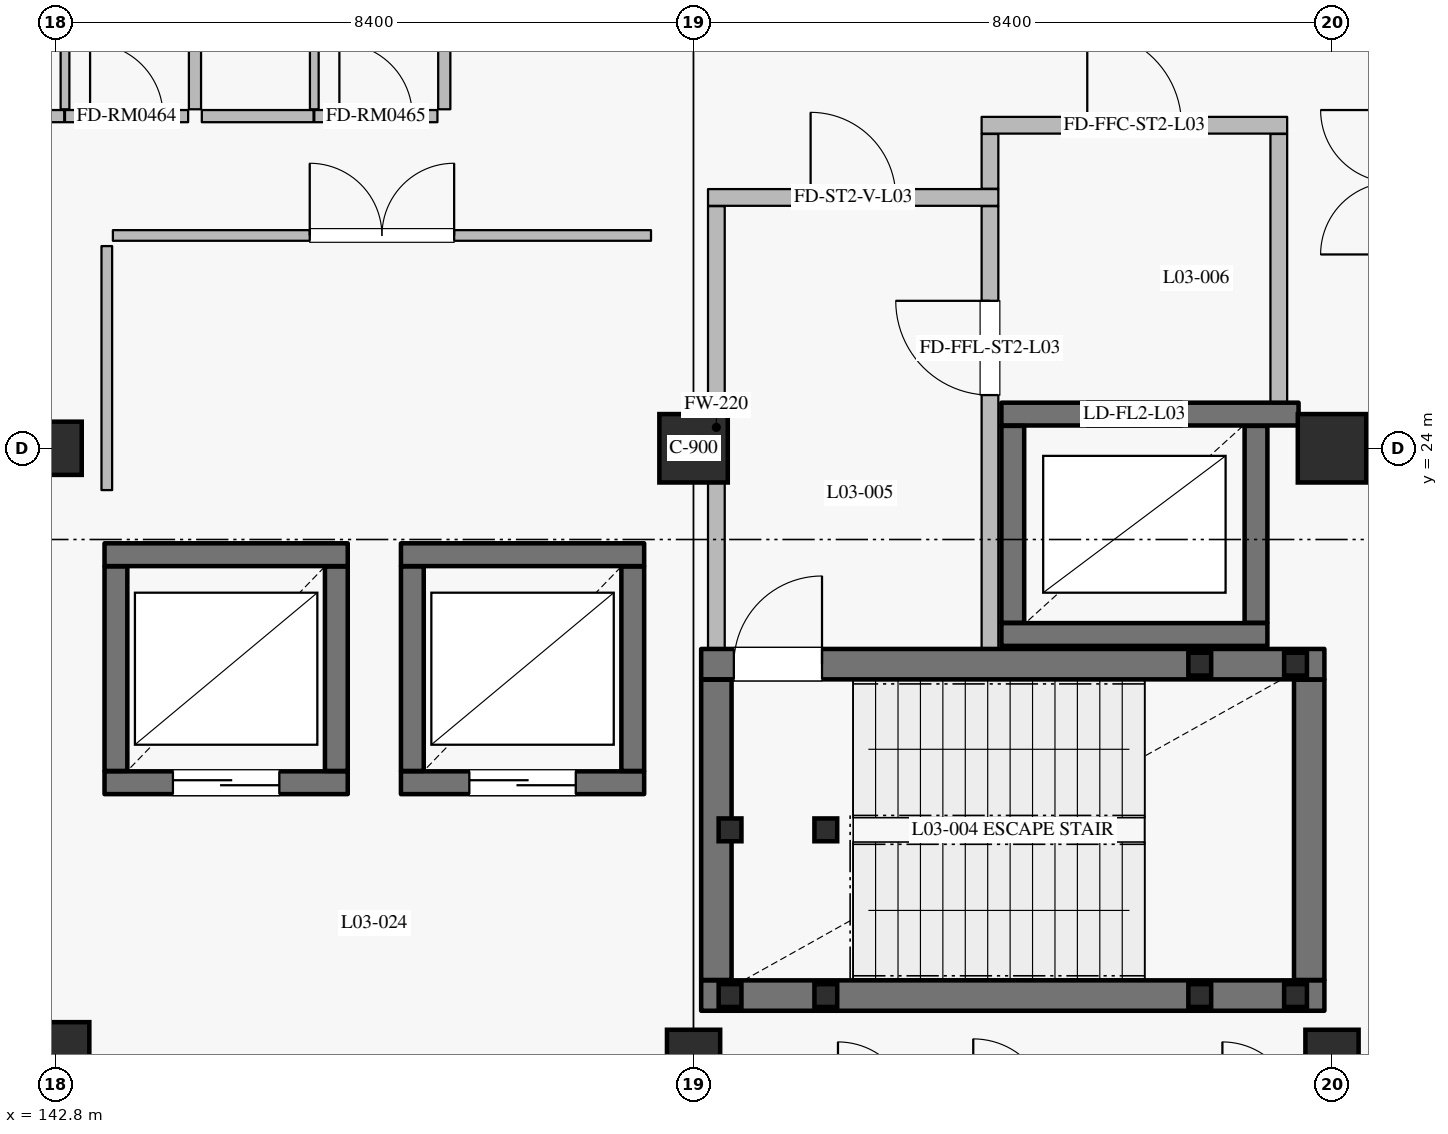
"""IFC4 building model, lengths in metres.
Left out: names, types, materials, properties, quantities, classifications, styles, units other than length and angle.
Written with IfcOpenShell. Run it as: python <this file> out.ifc"""

import sys

from ifc_helpers import new_model, si_unit, direction, frame, frame_2d, origin, origin_2d, place, context, subcontext, project, spatial, rectangle, hollow_rectangle, extrude, element, fill, save


model = new_model("IFC4")
c1 = context("Model", 3, precision=1e-05, world=origin(), true_north=direction((0.0, 1.0)))
c2 = subcontext(c1, "Body", "Model", "MODEL_VIEW")
j1 = project(units=[si_unit("LENGTHUNIT", "METRE"), si_unit("PLANEANGLEUNIT", "RADIAN")], contexts=[c1])
p1 = place(None, origin())
s1 = spatial("IfcSite", under=j1, at=p1, CompositionType="ELEMENT")
p2 = place(p1, origin())
s2 = spatial("IfcBuilding", under=s1, at=p2, CompositionType="ELEMENT")
p3 = place(p2, frame((0.0, 0.0, 16.2)))
s3 = spatial("IfcBuildingStorey", under=s2, at=p3, CompositionType="ELEMENT", Elevation=16.2)
for number, where, z_axis, x_axis in (
    (1, (142.8, 16.0, 0.0), (0.0, 0.0, 1.0), (1.0, 0.0, 0.0)),
    (2, (151.2, 24.0, 0.0), (0.0, 0.0, 1.0), (1.0, 0.0, 0.0)),
    (3, (159.6, 24.0, 0.0), (0.0, 0.0, 1.0), (1.0, 0.0, 0.0)),
):
    element("IfcColumn", number, at=place(p3, frame(where, z_axis=z_axis, x_axis=x_axis)), inside=s3, PredefinedType="COLUMN", context=c2, shape_type="SweptSolid", body=[
        extrude(rectangle(XDim=0.9, YDim=0.9, at=origin_2d()), origin(), (0.0, 0.0, 1.0), 4.8),
    ])
for number, where, z_axis, x_axis in (
    (4, (142.8, 24.0, 0.0), (0.0, 0.0, 1.0), (1.0, 0.0, 0.0)),
    (5, (151.2, 16.0, 0.0), (0.0, 0.0, 1.0), (1.0, 0.0, 0.0)),
    (6, (159.6, 16.0, 0.0), (0.0, 0.0, 1.0), (1.0, 0.0, 0.0)),
):
    element("IfcColumn", number, at=place(p3, frame(where, z_axis=z_axis, x_axis=x_axis)), inside=s3, PredefinedType="COLUMN", context=c2, shape_type="SweptSolid", body=[
        extrude(rectangle(XDim=0.7, YDim=0.7, at=origin_2d()), origin(), (0.0, 0.0, 1.0), 4.8),
    ])
p4 = place(p3, frame((155.25, 21.55, 0.0), z_axis=(0.0, 0.0, 1.0), x_axis=(1.0, 0.0, 0.0)))
e7 = element("IfcWall", 7, at=p4, inside=s3, PredefinedType="SHEAR", context=c2, shape_type="SweptSolid", body=[
    extrude(rectangle(XDim=3.5, YDim=0.3, at=frame_2d((1.75, 0.0))), origin(), (0.0, 0.0, 1.0), 4.535),
])
p5 = place(p3, frame((158.6, 21.705, 0.0), z_axis=(0.0, 0.0, 1.0), x_axis=(0.0, 1.0, 0.0)))
e8 = element("IfcWall", 8, at=p5, inside=s3, PredefinedType="SHEAR", context=c2, shape_type="SweptSolid", body=[
    extrude(rectangle(XDim=2.59, YDim=0.3, at=frame_2d((1.295, 0.0))), origin(), (0.0, 0.0, 1.0), 4.535),
])
p6 = place(p3, frame((159.16, 24.45, 0.0), z_axis=(0.0, 0.0, 1.0), x_axis=(-1.0, 0.0, 0.0)))
e9 = element("IfcWall", 9, at=p6, inside=s3, PredefinedType="SHEAR", context=c2, shape_type="SweptSolid", body=[
    extrude(rectangle(XDim=3.91, YDim=0.3, at=frame_2d((1.955, 0.0))), origin(), (0.0, 0.0, 1.0), 4.535),
])
p7 = place(p6, frame((1.535, 0.0, 0.0)))
e10 = element("IfcOpeningElement", 10, at=p7, cuts=e9, PredefinedType="OPENING", context=c2, shape_type="SweptSolid", body=[
    extrude(rectangle(XDim=1.25, YDim=2.25, at=frame_2d((0.625, 1.125))), frame((0.0, 0.16, 0.0), z_axis=(0.0, -1.0, 0.0), x_axis=(1.0, 0.0, 0.0)), (0.0, 0.0, 1.0), 0.32),
])
p8 = place(p3, frame((155.4, 24.295, 0.0), z_axis=(0.0, 0.0, 1.0), x_axis=(0.0, -1.0, 0.0)))
e11 = element("IfcWall", 11, at=p8, inside=s3, PredefinedType="SHEAR", context=c2, shape_type="SweptSolid", body=[
    extrude(rectangle(XDim=2.59, YDim=0.3, at=frame_2d((1.295, 0.0))), origin(), (0.0, 0.0, 1.0), 4.535),
])
p9 = place(p3, frame((143.45, 19.6, 0.0), z_axis=(0.0, 0.0, 1.0), x_axis=(1.0, 0.0, 0.0)))
e12 = element("IfcWall", 12, at=p9, inside=s3, PredefinedType="SHEAR", context=c2, shape_type="SweptSolid", body=[
    extrude(rectangle(XDim=3.2, YDim=0.3, at=frame_2d((1.6, 0.0))), origin(), (0.0, 0.0, 1.0), 4.535),
])
p10 = place(p9, frame((0.9, 0.0, 0.0)))
e13 = element("IfcOpeningElement", 13, at=p10, cuts=e12, PredefinedType="OPENING", context=c2, shape_type="SweptSolid", body=[
    extrude(rectangle(XDim=1.4, YDim=2.35, at=frame_2d((0.7, 1.175))), frame((0.0, 0.16, 0.0), z_axis=(0.0, -1.0, 0.0), x_axis=(1.0, 0.0, 0.0)), (0.0, 0.0, 1.0), 0.32),
])
p11 = place(p3, frame((146.5, 19.755, 0.0), z_axis=(0.0, 0.0, 1.0), x_axis=(0.0, 1.0, 0.0)))
e14 = element("IfcWall", 14, at=p11, inside=s3, PredefinedType="SHEAR", context=c2, shape_type="SweptSolid", body=[
    extrude(rectangle(XDim=2.69, YDim=0.3, at=frame_2d((1.345, 0.0))), origin(), (0.0, 0.0, 1.0), 4.535),
])
p12 = place(p3, frame((146.65, 22.6, 0.0), z_axis=(0.0, 0.0, 1.0), x_axis=(-1.0, 0.0, 0.0)))
e15 = element("IfcWall", 15, at=p12, inside=s3, PredefinedType="SHEAR", context=c2, shape_type="SweptSolid", body=[
    extrude(rectangle(XDim=3.2, YDim=0.3, at=frame_2d((1.6, 0.0))), origin(), (0.0, 0.0, 1.0), 4.535),
])
p13 = place(p3, frame((143.6, 22.445, 0.0), z_axis=(0.0, 0.0, 1.0), x_axis=(0.0, -1.0, 0.0)))
e16 = element("IfcWall", 16, at=p13, inside=s3, PredefinedType="SHEAR", context=c2, shape_type="SweptSolid", body=[
    extrude(rectangle(XDim=2.69, YDim=0.3, at=frame_2d((1.345, 0.0))), origin(), (0.0, 0.0, 1.0), 4.535),
])
p14 = place(p3, frame((147.35, 19.6, 0.0), z_axis=(0.0, 0.0, 1.0), x_axis=(1.0, 0.0, 0.0)))
e17 = element("IfcWall", 17, at=p14, inside=s3, PredefinedType="SHEAR", context=c2, shape_type="SweptSolid", body=[
    extrude(rectangle(XDim=3.2, YDim=0.3, at=frame_2d((1.6, 0.0))), origin(), (0.0, 0.0, 1.0), 4.535),
])
p15 = place(p14, frame((0.9, 0.0, 0.0)))
e18 = element("IfcOpeningElement", 18, at=p15, cuts=e17, PredefinedType="OPENING", context=c2, shape_type="SweptSolid", body=[
    extrude(rectangle(XDim=1.4, YDim=2.35, at=frame_2d((0.7, 1.175))), frame((0.0, 0.16, 0.0), z_axis=(0.0, -1.0, 0.0), x_axis=(1.0, 0.0, 0.0)), (0.0, 0.0, 1.0), 0.32),
])
p16 = place(p3, frame((150.4, 19.755, 0.0), z_axis=(0.0, 0.0, 1.0), x_axis=(0.0, 1.0, 0.0)))
e19 = element("IfcWall", 19, at=p16, inside=s3, PredefinedType="SHEAR", context=c2, shape_type="SweptSolid", body=[
    extrude(rectangle(XDim=2.69, YDim=0.3, at=frame_2d((1.345, 0.0))), origin(), (0.0, 0.0, 1.0), 4.535),
])
p17 = place(p3, frame((150.55, 22.6, 0.0), z_axis=(0.0, 0.0, 1.0), x_axis=(-1.0, 0.0, 0.0)))
e20 = element("IfcWall", 20, at=p17, inside=s3, PredefinedType="SHEAR", context=c2, shape_type="SweptSolid", body=[
    extrude(rectangle(XDim=3.2, YDim=0.3, at=frame_2d((1.6, 0.0))), origin(), (0.0, 0.0, 1.0), 4.535),
])
p18 = place(p3, frame((147.5, 22.445, 0.0), z_axis=(0.0, 0.0, 1.0), x_axis=(0.0, -1.0, 0.0)))
e21 = element("IfcWall", 21, at=p18, inside=s3, PredefinedType="SHEAR", context=c2, shape_type="SweptSolid", body=[
    extrude(rectangle(XDim=2.69, YDim=0.3, at=frame_2d((1.345, 0.0))), origin(), (0.0, 0.0, 1.0), 4.535),
])
p19 = place(p3, frame((151.3, 16.8, 0.0), z_axis=(0.0, 0.0, 1.0), x_axis=(1.0, 0.0, 0.0)))
e22 = element("IfcWall", 22, at=p19, inside=s3, PredefinedType="SHEAR", context=c2, shape_type="SweptSolid", body=[
    extrude(rectangle(XDim=8.2, YDim=0.4, at=frame_2d((4.1, 0.0))), origin(), (0.0, 0.0, 1.0), 4.535),
])
p20 = place(p3, frame((159.3, 17.005, 0.0), z_axis=(0.0, 0.0, 1.0), x_axis=(0.0, 1.0, 0.0)))
e23 = element("IfcWall", 23, at=p20, inside=s3, PredefinedType="SHEAR", context=c2, shape_type="SweptSolid", body=[
    extrude(rectangle(XDim=3.95, YDim=0.4, at=frame_2d((1.975, 0.0))), origin(), (0.0, 0.0, 1.0), 4.535),
])
p21 = place(p3, frame((151.3, 21.16, 0.0), z_axis=(0.0, 0.0, 1.0), x_axis=(1.0, 0.0, 0.0)))
e24 = element("IfcWall", 24, at=p21, inside=s3, PredefinedType="SHEAR", context=c2, shape_type="SweptSolid", body=[
    extrude(rectangle(XDim=8.2, YDim=0.4, at=frame_2d((4.1, 0.0))), origin(), (0.0, 0.0, 1.0), 4.535),
])
p22 = place(p21, frame((0.43, 0.0, 0.0)))
e25 = element("IfcOpeningElement", 25, at=p22, cuts=e24, PredefinedType="OPENING", context=c2, shape_type="SweptSolid", body=[
    extrude(rectangle(XDim=1.16, YDim=2.2, at=frame_2d((0.58, 1.1))), frame((0.0, 0.21, 0.0), z_axis=(0.0, -1.0, 0.0), x_axis=(1.0, 0.0, 0.0)), (0.0, 0.0, 1.0), 0.42),
])
p23 = place(p3, frame((151.5, 17.005, 0.0), z_axis=(0.0, 0.0, 1.0), x_axis=(0.0, 1.0, 0.0)))
e26 = element("IfcWall", 26, at=p23, inside=s3, PredefinedType="SHEAR", context=c2, shape_type="SweptSolid", body=[
    extrude(rectangle(XDim=3.95, YDim=0.4, at=frame_2d((1.975, 0.0))), origin(), (0.0, 0.0, 1.0), 4.535),
])
p24 = place(p3, frame((151.5, 21.365, 0.0), z_axis=(0.0, 0.0, 1.0), x_axis=(0.0, 1.0, 0.0)))
e27 = element("IfcWall", 27, at=p24, inside=s3, PredefinedType="PARTITIONING", context=c2, shape_type="SweptSolid", body=[
    extrude(rectangle(XDim=5.82, YDim=0.22, at=frame_2d((2.91, 0.0))), origin(), (0.0, 0.0, 1.0), 4.535),
])
p25 = place(p3, frame((151.39, 27.3, 0.0), z_axis=(0.0, 0.0, 1.0), x_axis=(1.0, 0.0, 0.0)))
e28 = element("IfcWall", 28, at=p25, inside=s3, PredefinedType="PARTITIONING", context=c2, shape_type="SweptSolid", body=[
    extrude(rectangle(XDim=3.82, YDim=0.22, at=frame_2d((1.91, 0.0))), origin(), (0.0, 0.0, 1.0), 4.535),
])
p26 = place(p25, frame((1.35, 0.0, 0.0)))
e29 = element("IfcOpeningElement", 29, at=p26, cuts=e28, PredefinedType="OPENING", context=c2, shape_type="SweptSolid", body=[
    extrude(rectangle(XDim=1.12, YDim=2.2, at=frame_2d((0.56, 1.1))), frame((0.0, 0.12, 0.0), z_axis=(0.0, -1.0, 0.0), x_axis=(1.0, 0.0, 0.0)), (0.0, 0.0, 1.0), 0.24),
])
p27 = place(p3, frame((155.1, 21.365, 0.0), z_axis=(0.0, 0.0, 1.0), x_axis=(0.0, 1.0, 0.0)))
e30 = element("IfcWall", 30, at=p27, inside=s3, PredefinedType="PARTITIONING", context=c2, shape_type="SweptSolid", body=[
    extrude(rectangle(XDim=5.82, YDim=0.22, at=frame_2d((2.91, 0.0))), origin(), (0.0, 0.0, 1.0), 4.535),
])
p28 = place(p27, frame((3.335, 0.0, 0.0)))
e31 = element("IfcOpeningElement", 31, at=p28, cuts=e30, PredefinedType="OPENING", context=c2, shape_type="SweptSolid", body=[
    extrude(rectangle(XDim=1.24, YDim=2.2, at=frame_2d((0.62, 1.1))), frame((0.0, 0.12, 0.0), z_axis=(0.0, -1.0, 0.0), x_axis=(1.0, 0.0, 0.0)), (0.0, 0.0, 1.0), 0.24),
])
p29 = place(p3, frame((155.1, 27.415, 0.0), z_axis=(0.0, 0.0, 1.0), x_axis=(0.0, 1.0, 0.0)))
e32 = element("IfcWall", 32, at=p29, inside=s3, PredefinedType="PARTITIONING", context=c2, shape_type="SweptSolid", body=[
    extrude(rectangle(XDim=0.72, YDim=0.22, at=frame_2d((0.36, 0.0))), origin(), (0.0, 0.0, 1.0), 4.535),
])
p30 = place(p3, frame((158.9, 24.605, 0.0), z_axis=(0.0, 0.0, 1.0), x_axis=(0.0, 1.0, 0.0)))
e33 = element("IfcWall", 33, at=p30, inside=s3, PredefinedType="PARTITIONING", context=c2, shape_type="SweptSolid", body=[
    extrude(rectangle(XDim=3.53, YDim=0.22, at=frame_2d((1.765, 0.0))), origin(), (0.0, 0.0, 1.0), 4.535),
])
p31 = place(p3, frame((154.99, 28.25, 0.0), z_axis=(0.0, 0.0, 1.0), x_axis=(1.0, 0.0, 0.0)))
e34 = element("IfcWall", 34, at=p31, inside=s3, PredefinedType="PARTITIONING", context=c2, shape_type="SweptSolid", body=[
    extrude(rectangle(XDim=4.02, YDim=0.22, at=frame_2d((2.01, 0.0))), origin(), (0.0, 0.0, 1.0), 4.535),
])
p32 = place(p31, frame((1.39, 0.0, 0.0)))
e35 = element("IfcOpeningElement", 35, at=p32, cuts=e34, PredefinedType="OPENING", context=c2, shape_type="SweptSolid", body=[
    extrude(rectangle(XDim=1.24, YDim=2.2, at=frame_2d((0.62, 1.1))), frame((0.0, 0.12, 0.0), z_axis=(0.0, -1.0, 0.0), x_axis=(1.0, 0.0, 0.0)), (0.0, 0.0, 1.0), 0.24),
])
for number, where, z_axis, x_axis in (
    (36, (151.68, 16.8, 0.0), (0.0, 0.0, 1.0), (1.0, 0.0, 0.0)),
    (37, (151.68, 18.98, 0.0), (0.0, 0.0, 1.0), (1.0, 0.0, 0.0)),
    (38, (152.94, 16.8, 0.0), (0.0, 0.0, 1.0), (1.0, 0.0, 0.0)),
    (39, (152.94, 18.98, 0.0), (0.0, 0.0, 1.0), (1.0, 0.0, 0.0)),
):
    element("IfcColumn", number, at=place(p3, frame(where, z_axis=z_axis, x_axis=x_axis)), inside=s3, PredefinedType="COLUMN", context=c2, shape_type="SweptSolid", body=[
        extrude(hollow_rectangle(XDim=0.3, YDim=0.3, WallThickness=0.012, at=origin_2d()), origin(), (0.0, 0.0, 1.0), 4.62),
    ])
for number, where, z_axis, x_axis in (
    (40, (157.86, 16.8, -2.4), (0.0, 0.0, 1.0), (1.0, 0.0, 0.0)),
    (41, (157.86, 21.16, -2.4), (0.0, 0.0, 1.0), (1.0, 0.0, 0.0)),
    (42, (159.12, 16.8, -2.4), (0.0, 0.0, 1.0), (1.0, 0.0, 0.0)),
    (43, (159.12, 21.16, -2.4), (0.0, 0.0, 1.0), (1.0, 0.0, 0.0)),
):
    element("IfcColumn", number, at=place(p3, frame(where, z_axis=z_axis, x_axis=x_axis)), inside=s3, PredefinedType="COLUMN", context=c2, shape_type="SweptSolid", body=[
        extrude(hollow_rectangle(XDim=0.3, YDim=0.3, WallThickness=0.012, at=origin_2d()), origin(), (0.0, 0.0, 1.0), 4.62),
    ])
p33 = place(p3, frame((141.45, 28.37, 0.0), z_axis=(0.0, 0.0, 1.0), x_axis=(1.0, 0.0, 0.0)))
e44 = element("IfcWall", 44, at=p33, inside=s3, PredefinedType="PARTITIONING", context=c2, shape_type="SweptSolid", body=[
    extrude(rectangle(XDim=1.47, YDim=0.16, at=frame_2d((0.735, 0.0))), origin(), (0.0, 0.0, 1.0), 4.535),
])
p34 = place(p3, frame((142.93, 28.37, 0.0), z_axis=(0.0, 0.0, 1.0), x_axis=(1.0, 0.0, 0.0)))
e45 = element("IfcWall", 45, at=p34, inside=s3, PredefinedType="PARTITIONING", context=c2, shape_type="SweptSolid", body=[
    extrude(rectangle(XDim=1.62, YDim=0.16, at=frame_2d((0.81, 0.0))), origin(), (0.0, 0.0, 1.0), 4.535),
])
p35 = place(p34, frame((0.33, 0.0, 0.0)))
e46 = element("IfcOpeningElement", 46, at=p35, cuts=e45, PredefinedType="OPENING", context=c2, shape_type="SweptSolid", body=[
    extrude(rectangle(XDim=0.96, YDim=2.2, at=frame_2d((0.48, 1.1))), frame((0.0, 0.09, 0.0), z_axis=(0.0, -1.0, 0.0), x_axis=(1.0, 0.0, 0.0)), (0.0, 0.0, 1.0), 0.18),
])
p36 = place(p3, frame((142.93, 28.46, 0.0), z_axis=(0.0, 0.0, 1.0), x_axis=(0.0, 1.0, 0.0)))
e47 = element("IfcWall", 47, at=p36, inside=s3, PredefinedType="PARTITIONING", context=c2, shape_type="SweptSolid", body=[
    extrude(rectangle(XDim=1.74, YDim=0.115, at=frame_2d((0.87, 0.0))), origin(), (0.0, 0.0, 1.0), 4.535),
])
p37 = place(p3, frame((144.73, 28.37, 0.0), z_axis=(0.0, 0.0, 1.0), x_axis=(1.0, 0.0, 0.0)))
e48 = element("IfcWall", 48, at=p37, inside=s3, PredefinedType="PARTITIONING", context=c2, shape_type="SweptSolid", body=[
    extrude(rectangle(XDim=1.47, YDim=0.16, at=frame_2d((0.735, 0.0))), origin(), (0.0, 0.0, 1.0), 4.535),
])
p38 = place(p3, frame((146.21, 28.37, 0.0), z_axis=(0.0, 0.0, 1.0), x_axis=(1.0, 0.0, 0.0)))
e49 = element("IfcWall", 49, at=p38, inside=s3, PredefinedType="PARTITIONING", context=c2, shape_type="SweptSolid", body=[
    extrude(rectangle(XDim=1.62, YDim=0.16, at=frame_2d((0.81, 0.0))), origin(), (0.0, 0.0, 1.0), 4.535),
])
p39 = place(p38, frame((0.33, 0.0, 0.0)))
e50 = element("IfcOpeningElement", 50, at=p39, cuts=e49, PredefinedType="OPENING", context=c2, shape_type="SweptSolid", body=[
    extrude(rectangle(XDim=0.96, YDim=2.2, at=frame_2d((0.48, 1.1))), frame((0.0, 0.09, 0.0), z_axis=(0.0, -1.0, 0.0), x_axis=(1.0, 0.0, 0.0)), (0.0, 0.0, 1.0), 0.18),
])
p40 = place(p3, frame((146.21, 28.46, 0.0), z_axis=(0.0, 0.0, 1.0), x_axis=(0.0, 1.0, 0.0)))
e51 = element("IfcWall", 51, at=p40, inside=s3, PredefinedType="PARTITIONING", context=c2, shape_type="SweptSolid", body=[
    extrude(rectangle(XDim=2.45, YDim=0.115, at=frame_2d((1.225, 0.0))), origin(), (0.0, 0.0, 1.0), 4.535),
])
p41 = place(p3, frame((144.64, 28.46, 0.0), z_axis=(0.0, 0.0, 1.0), x_axis=(0.0, 1.0, 0.0)))
e52 = element("IfcWall", 52, at=p41, inside=s3, PredefinedType="PARTITIONING", context=c2, shape_type="SweptSolid", body=[
    extrude(rectangle(XDim=4.95, YDim=0.16, at=frame_2d((2.475, 0.0))), origin(), (0.0, 0.0, 1.0), 4.535),
])
p42 = place(p3, frame((147.92, 28.46, 0.0), z_axis=(0.0, 0.0, 1.0), x_axis=(0.0, 1.0, 0.0)))
e53 = element("IfcWall", 53, at=p42, inside=s3, PredefinedType="PARTITIONING", context=c2, shape_type="SweptSolid", body=[
    extrude(rectangle(XDim=4.44, YDim=0.16, at=frame_2d((2.22, 0.0))), origin(), (0.0, 0.0, 1.0), 4.535),
])
p43 = place(p3, frame((143.56, 26.8, 0.0), z_axis=(0.0, 0.0, 1.0), x_axis=(1.0, 0.0, 0.0)))
e54 = element("IfcWall", 54, at=p43, inside=s3, PredefinedType="PARTITIONING", context=c2, shape_type="SweptSolid", body=[
    extrude(rectangle(XDim=7.08, YDim=0.14, at=frame_2d((3.54, 0.0))), origin(), (0.0, 0.0, 1.0), 4.535),
])
p44 = place(p43, frame((2.59, 0.0, 0.0)))
e55 = element("IfcOpeningElement", 55, at=p44, cuts=e54, PredefinedType="OPENING", context=c2, shape_type="SweptSolid", body=[
    extrude(rectangle(XDim=1.9, YDim=2.4, at=frame_2d((0.95, 1.2))), frame((0.0, 0.08, 0.0), z_axis=(0.0, -1.0, 0.0), x_axis=(1.0, 0.0, 0.0)), (0.0, 0.0, 1.0), 0.16),
])
p45 = place(p3, frame((143.48, 23.45, 0.0), z_axis=(0.0, 0.0, 1.0), x_axis=(0.0, 1.0, 0.0)))
e56 = element("IfcWall", 56, at=p45, inside=s3, PredefinedType="PARTITIONING", context=c2, shape_type="SweptSolid", body=[
    extrude(rectangle(XDim=3.21, YDim=0.14, at=frame_2d((1.605, 0.0))), origin(), (0.0, 0.0, 1.0), 4.535),
])
p46 = place(p7, origin())
e57 = element("IfcDoor", 57, at=p46, inside=s3, OperationType="DOUBLE_DOOR_SLIDING", PredefinedType="DOOR", context=c2, shape_type="SweptSolid", body=[
    extrude(rectangle(XDim=1.25, YDim=2.25, at=frame_2d((0.625, 1.125))), frame((0.0, 0.025, 0.0), z_axis=(0.0, -1.0, 0.0), x_axis=(1.0, 0.0, 0.0)), (0.0, 0.0, 1.0), 0.05),
])
fill(e10, e57)
p47 = place(p10, origin())
e58 = element("IfcDoor", 58, at=p47, inside=s3, OperationType="DOUBLE_DOOR_SLIDING", PredefinedType="DOOR", context=c2, shape_type="SweptSolid", body=[
    extrude(rectangle(XDim=1.4, YDim=2.35, at=frame_2d((0.7, 1.175))), frame((0.0, 0.025, 0.0), z_axis=(0.0, -1.0, 0.0), x_axis=(1.0, 0.0, 0.0)), (0.0, 0.0, 1.0), 0.05),
])
fill(e13, e58)
p48 = place(p15, origin())
e59 = element("IfcDoor", 59, at=p48, inside=s3, OperationType="DOUBLE_DOOR_SLIDING", PredefinedType="DOOR", context=c2, shape_type="SweptSolid", body=[
    extrude(rectangle(XDim=1.4, YDim=2.35, at=frame_2d((0.7, 1.175))), frame((0.0, 0.025, 0.0), z_axis=(0.0, -1.0, 0.0), x_axis=(1.0, 0.0, 0.0)), (0.0, 0.0, 1.0), 0.05),
])
fill(e18, e59)
p49 = place(p22, origin())
e60 = element("IfcDoor", 60, at=p49, inside=s3, OperationType="SINGLE_SWING_RIGHT", PredefinedType="DOOR", context=c2, shape_type="SweptSolid", body=[
    extrude(rectangle(XDim=1.16, YDim=2.2, at=frame_2d((0.58, 1.1))), frame((0.0, 0.025, 0.0), z_axis=(0.0, -1.0, 0.0), x_axis=(1.0, 0.0, 0.0)), (0.0, 0.0, 1.0), 0.05),
])
fill(e25, e60)
p50 = place(p26, origin())
e61 = element("IfcDoor", 61, at=p50, inside=s3, OperationType="SINGLE_SWING_LEFT", PredefinedType="DOOR", context=c2, shape_type="SweptSolid", body=[
    extrude(rectangle(XDim=1.12, YDim=2.2, at=frame_2d((0.56, 1.1))), frame((0.0, 0.025, 0.0), z_axis=(0.0, -1.0, 0.0), x_axis=(1.0, 0.0, 0.0)), (0.0, 0.0, 1.0), 0.05),
])
fill(e29, e61)
p51 = place(p28, origin())
e62 = element("IfcDoor", 62, at=p51, inside=s3, OperationType="SINGLE_SWING_RIGHT", PredefinedType="DOOR", context=c2, shape_type="SweptSolid", body=[
    extrude(rectangle(XDim=1.24, YDim=2.2, at=frame_2d((0.62, 1.1))), frame((0.0, 0.025, 0.0), z_axis=(0.0, -1.0, 0.0), x_axis=(1.0, 0.0, 0.0)), (0.0, 0.0, 1.0), 0.05),
])
fill(e31, e62)
p52 = place(p32, origin())
e63 = element("IfcDoor", 63, at=p52, inside=s3, OperationType="SINGLE_SWING_LEFT", PredefinedType="DOOR", context=c2, shape_type="SweptSolid", body=[
    extrude(rectangle(XDim=1.24, YDim=2.2, at=frame_2d((0.62, 1.1))), frame((0.0, 0.025, 0.0), z_axis=(0.0, -1.0, 0.0), x_axis=(1.0, 0.0, 0.0)), (0.0, 0.0, 1.0), 0.05),
])
fill(e35, e63)
p53 = place(p35, origin())
e64 = element("IfcDoor", 64, at=p53, inside=s3, OperationType="SINGLE_SWING_LEFT", PredefinedType="DOOR", context=c2, shape_type="SweptSolid", body=[
    extrude(rectangle(XDim=0.96, YDim=2.2, at=frame_2d((0.48, 1.1))), frame((0.0, 0.025, 0.0), z_axis=(0.0, -1.0, 0.0), x_axis=(1.0, 0.0, 0.0)), (0.0, 0.0, 1.0), 0.05),
])
fill(e46, e64)
p54 = place(p39, origin())
e65 = element("IfcDoor", 65, at=p54, inside=s3, OperationType="SINGLE_SWING_LEFT", PredefinedType="DOOR", context=c2, shape_type="SweptSolid", body=[
    extrude(rectangle(XDim=0.96, YDim=2.2, at=frame_2d((0.48, 1.1))), frame((0.0, 0.025, 0.0), z_axis=(0.0, -1.0, 0.0), x_axis=(1.0, 0.0, 0.0)), (0.0, 0.0, 1.0), 0.05),
])
fill(e50, e65)
p55 = place(p44, origin())
e66 = element("IfcDoor", 66, at=p55, inside=s3, OperationType="DOUBLE_DOOR_SINGLE_SWING", PredefinedType="DOOR", context=c2, shape_type="SweptSolid", body=[
    extrude(rectangle(XDim=1.9, YDim=2.4, at=frame_2d((0.95, 1.2))), frame((0.0, 0.025, 0.0), z_axis=(0.0, -1.0, 0.0), x_axis=(1.0, 0.0, 0.0)), (0.0, 0.0, 1.0), 0.05),
])
fill(e55, e66)
save(model, sys.argv[1])
